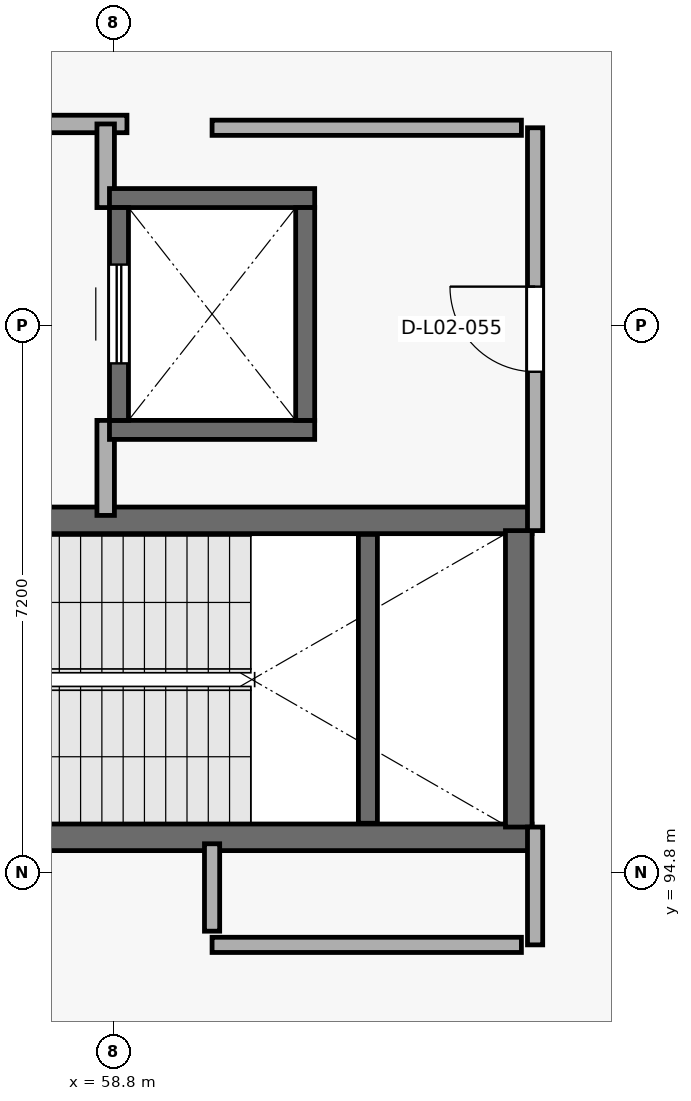
"""IFC4 building model, lengths in metres.
Left out: names, types, materials, properties, quantities, classifications, styles, units other than length and angle.
Written with IfcOpenShell. Run it as: python <this file> out.ifc"""

import sys

from ifc_helpers import new_model, si_unit, direction, frame, frame_2d, origin, place, context, subcontext, project, spatial, rectangle, extrude, element, fill, save


model = new_model("IFC4")
c1 = context("Model", 3, precision=1e-05, world=origin(), true_north=direction((0.0, 1.0)))
c2 = subcontext(c1, "Body", "Model", "MODEL_VIEW")
j1 = project(units=[si_unit("LENGTHUNIT", "METRE"), si_unit("PLANEANGLEUNIT", "RADIAN")], contexts=[c1])
p1 = place(None, origin())
s1 = spatial("IfcSite", under=j1, at=p1, CompositionType="ELEMENT")
p2 = place(p1, origin())
s2 = spatial("IfcBuilding", under=s1, at=p2, CompositionType="ELEMENT")
p3 = place(p2, frame((0.0, 0.0, 5.4)))
s3 = spatial("IfcBuildingStorey", under=s2, at=p3, CompositionType="ELEMENT", Elevation=5.4)
p4 = place(p3, frame((55.09, 95.265, 0.0), z_axis=(0.0, 0.0, 1.0), x_axis=(1.0, 0.0, 0.0)))
e1 = element("IfcWall", 1, at=p4, inside=s3, PredefinedType="SHEAR", context=c2, shape_type="SweptSolid", body=[
    extrude(rectangle(XDim=9.22, YDim=0.35, at=frame_2d((4.61, 0.0))), origin(), (0.0, 0.0, 1.0), 4.52),
])
p5 = place(p4, frame((0.45, 0.0, 0.0)))
e2 = element("IfcOpeningElement", 2, at=p5, cuts=e1, PredefinedType="OPENING", context=c2, shape_type="SweptSolid", body=[
    extrude(rectangle(XDim=1.25, YDim=2.2, at=frame_2d((0.625, 1.1))), frame((0.0, 0.185, 0.0), z_axis=(0.0, -1.0, 0.0), x_axis=(1.0, 0.0, 0.0)), (0.0, 0.0, 1.0), 0.37),
])
p6 = place(p3, frame((64.31, 99.435, 0.0), z_axis=(0.0, 0.0, 1.0), x_axis=(-1.0, 0.0, 0.0)))
e3 = element("IfcWall", 3, at=p6, inside=s3, PredefinedType="SHEAR", context=c2, shape_type="SweptSolid", body=[
    extrude(rectangle(XDim=9.22, YDim=0.35, at=frame_2d((4.61, 0.0))), origin(), (0.0, 0.0, 1.0), 4.52),
])
p7 = place(p6, frame((7.72, 0.0, 0.0)))
e4 = element("IfcOpeningElement", 4, at=p7, cuts=e3, PredefinedType="OPENING", context=c2, shape_type="SweptSolid", body=[
    extrude(rectangle(XDim=1.2, YDim=2.2, at=frame_2d((0.6, 1.1))), frame((0.0, 0.185, 0.0), z_axis=(0.0, -1.0, 0.0), x_axis=(1.0, 0.0, 0.0)), (0.0, 0.0, 1.0), 0.37),
])
p8 = place(p3, frame((64.135, 99.3, 0.0), z_axis=(0.0, 0.0, 1.0), x_axis=(0.0, -1.0, 0.0)))
e5 = element("IfcWall", 5, at=p8, inside=s3, PredefinedType="SHEAR", context=c2, shape_type="SweptSolid", body=[
    extrude(rectangle(XDim=3.9, YDim=0.35, at=frame_2d((1.95, 0.0))), origin(), (0.0, 0.0, 1.0), 4.52),
])
p9 = place(p3, frame((62.15, 95.45, 0.0), z_axis=(0.0, 0.0, 1.0), x_axis=(0.0, 1.0, 0.0)))
e6 = element("IfcWall", 6, at=p9, inside=s3, PredefinedType="SHEAR", context=c2, shape_type="SweptSolid", body=[
    extrude(rectangle(XDim=3.8, YDim=0.25, at=frame_2d((1.9, 0.0))), origin(), (0.0, 0.0, 1.0), 2.22),
])
p10 = place(p3, frame((55.09, 104.65, 0.0), z_axis=(0.0, 0.0, 1.0), x_axis=(1.0, 0.0, 0.0)))
e7 = element("IfcWall", 7, at=p10, inside=s3, PredefinedType="PARTITIONING", context=c2, shape_type="SweptSolid", body=[
    extrude(rectangle(XDim=3.89, YDim=0.23, at=frame_2d((1.945, 0.0))), origin(), (0.0, 0.0, 1.0), 4.52),
])
p11 = place(p10, frame((1.15, 0.0, 0.0)))
e8 = element("IfcOpeningElement", 8, at=p11, cuts=e7, PredefinedType="OPENING", context=c2, shape_type="SweptSolid", body=[
    extrude(rectangle(XDim=1.2, YDim=2.2, at=frame_2d((0.6, 1.1))), frame((0.0, 0.125, 0.0), z_axis=(0.0, -1.0, 0.0), x_axis=(1.0, 0.0, 0.0)), (0.0, 0.0, 1.0), 0.25),
])
p12 = place(p3, frame((58.7, 104.65, 0.0), z_axis=(0.0, 0.0, 1.0), x_axis=(0.0, -1.0, 0.0)))
e9 = element("IfcWall", 9, at=p12, inside=s3, PredefinedType="PARTITIONING", context=c2, shape_type="SweptSolid", body=[
    extrude(rectangle(XDim=1.1, YDim=0.23, at=frame_2d((0.55, 0.0))), origin(), (0.0, 0.0, 1.0), 4.52),
])
p13 = place(p3, frame((58.7, 100.75, 0.0), z_axis=(0.0, 0.0, 1.0), x_axis=(0.0, -1.0, 0.0)))
e10 = element("IfcWall", 10, at=p13, inside=s3, PredefinedType="PARTITIONING", context=c2, shape_type="SweptSolid", body=[
    extrude(rectangle(XDim=1.25, YDim=0.23, at=frame_2d((0.625, 0.0))), origin(), (0.0, 0.0, 1.0), 4.52),
])
for number, where, z_axis, x_axis in (
    (11, (58.75, 100.625, 0.0), (0.0, 0.0, 1.0), (1.0, 0.0, 0.0)),
    (12, (61.45, 103.675, 0.0), (0.0, 0.0, 1.0), (-1.0, 0.0, 0.0)),
):
    element("IfcWall", number, at=place(p3, frame(where, z_axis=z_axis, x_axis=x_axis)), inside=s3, PredefinedType="SHEAR", context=c2, shape_type="SweptSolid", body=[
        extrude(rectangle(XDim=2.7, YDim=0.25, at=frame_2d((1.35, 0.0))), origin(), (0.0, 0.0, 1.0), 4.52),
    ])
p14 = place(p3, frame((58.875, 100.75, 0.0), z_axis=(0.0, 0.0, 1.0), x_axis=(0.0, 1.0, 0.0)))
e13 = element("IfcWall", 13, at=p14, inside=s3, PredefinedType="SHEAR", context=c2, shape_type="SweptSolid", body=[
    extrude(rectangle(XDim=2.8, YDim=0.25, at=frame_2d((1.4, 0.0))), origin(), (0.0, 0.0, 1.0), 4.52),
])
p15 = place(p14, frame((0.75, 0.0, 0.0)))
e14 = element("IfcOpeningElement", 14, at=p15, cuts=e13, PredefinedType="OPENING", context=c2, shape_type="SweptSolid", body=[
    extrude(rectangle(XDim=1.3, YDim=2.25, at=frame_2d((0.65, 1.125))), frame((0.0, 0.135, 0.0), z_axis=(0.0, -1.0, 0.0), x_axis=(1.0, 0.0, 0.0)), (0.0, 0.0, 1.0), 0.27),
])
p16 = place(p3, frame((61.325, 103.55, 0.0), z_axis=(0.0, 0.0, 1.0), x_axis=(0.0, -1.0, 0.0)))
e15 = element("IfcWall", 15, at=p16, inside=s3, PredefinedType="SHEAR", context=c2, shape_type="SweptSolid", body=[
    extrude(rectangle(XDim=2.8, YDim=0.25, at=frame_2d((1.4, 0.0))), origin(), (0.0, 0.0, 1.0), 4.52),
])
p17 = place(p3, frame((64.35, 104.6, 0.0), z_axis=(0.0, 0.0, 1.0), x_axis=(0.0, -1.0, 0.0)))
e16 = element("IfcWall", 16, at=p17, inside=s3, PredefinedType="PARTITIONING", context=c2, shape_type="SweptSolid", body=[
    extrude(rectangle(XDim=5.3, YDim=0.2, at=frame_2d((2.65, 0.0))), origin(), (0.0, 0.0, 1.0), 4.52),
])
p18 = place(p17, frame((2.09, 0.0, 0.0)))
e17 = element("IfcOpeningElement", 17, at=p18, cuts=e16, PredefinedType="OPENING", context=c2, shape_type="SweptSolid", body=[
    extrude(rectangle(XDim=1.12, YDim=2.15, at=frame_2d((0.56, 1.075))), frame((0.0, 0.11, 0.0), z_axis=(0.0, -1.0, 0.0), x_axis=(1.0, 0.0, 0.0)), (0.0, 0.0, 1.0), 0.22),
])
p19 = place(p3, frame((64.35, 95.4, 0.0), z_axis=(0.0, 0.0, 1.0), x_axis=(0.0, -1.0, 0.0)))
e18 = element("IfcWall", 18, at=p19, inside=s3, PredefinedType="PARTITIONING", context=c2, shape_type="SweptSolid", body=[
    extrude(rectangle(XDim=1.55, YDim=0.2, at=frame_2d((0.775, 0.0))), origin(), (0.0, 0.0, 1.0), 4.52),
])
for number, where, z_axis, x_axis in (
    (19, (60.1, 104.6, 0.0), (0.0, 0.0, 1.0), (1.0, 0.0, 0.0)),
    (20, (64.17, 93.85, 0.0), (0.0, 0.0, 1.0), (-1.0, 0.0, 0.0)),
):
    element("IfcWall", number, at=place(p3, frame(where, z_axis=z_axis, x_axis=x_axis)), inside=s3, PredefinedType="PARTITIONING", context=c2, shape_type="SweptSolid", body=[
        extrude(rectangle(XDim=4.07, YDim=0.2, at=frame_2d((2.035, 0.0))), origin(), (0.0, 0.0, 1.0), 4.52),
    ])
p20 = place(p3, frame((60.1, 94.03, 0.0), z_axis=(0.0, 0.0, 1.0), x_axis=(0.0, 1.0, 0.0)))
e21 = element("IfcWall", 21, at=p20, inside=s3, PredefinedType="PARTITIONING", context=c2, shape_type="SweptSolid", body=[
    extrude(rectangle(XDim=1.15, YDim=0.2, at=frame_2d((0.575, 0.0))), origin(), (0.0, 0.0, 1.0), 4.52),
])
p21 = place(p15, origin())
e22 = element("IfcDoor", 22, at=p21, inside=s3, OperationType="SLIDING_TO_LEFT", PredefinedType="DOOR", context=c2, shape_type="SweptSolid", body=[
    extrude(rectangle(XDim=1.3, YDim=2.25, at=frame_2d((0.65, 1.125))), frame((0.0, 0.025, 0.0), z_axis=(0.0, -1.0, 0.0), x_axis=(1.0, 0.0, 0.0)), (0.0, 0.0, 1.0), 0.05),
])
fill(e14, e22)
p22 = place(p18, origin())
e23 = element("IfcDoor", 23, at=p22, inside=s3, OperationType="SINGLE_SWING_RIGHT", PredefinedType="DOOR", context=c2, shape_type="SweptSolid", body=[
    extrude(rectangle(XDim=1.12, YDim=2.15, at=frame_2d((0.56, 1.075))), frame((0.0, 0.025, 0.0), z_axis=(0.0, -1.0, 0.0), x_axis=(1.0, 0.0, 0.0)), (0.0, 0.0, 1.0), 0.05),
])
fill(e17, e23)
save(model, sys.argv[1])
